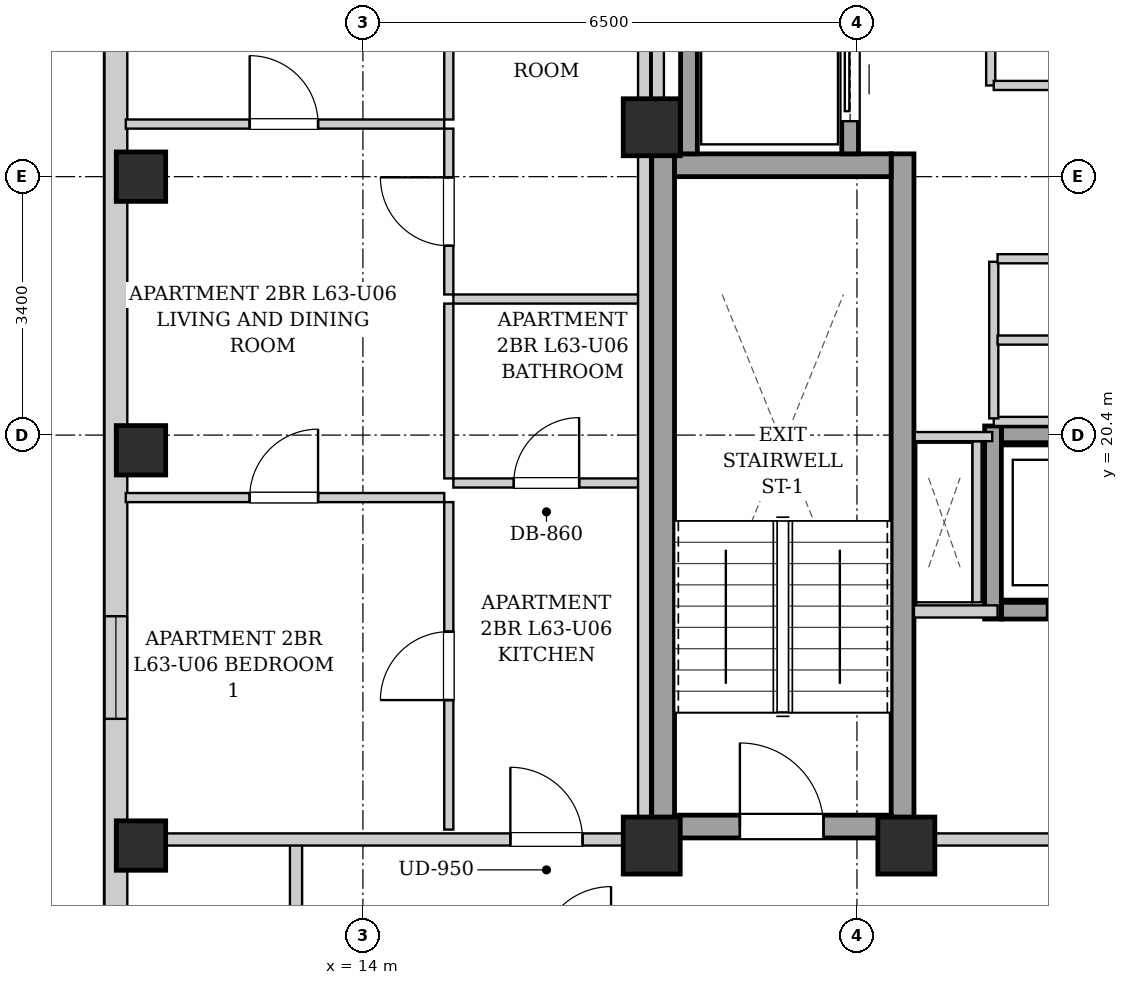
"""IFC4 building model, lengths in metres.
Left out: names, types, materials, properties, quantities, classifications, styles, units other than length and angle.
Written with IfcOpenShell. Run it as: python <this file> out.ifc"""

import sys

from ifc_helpers import new_model, si_unit, direction, frame, frame_2d, origin, origin_2d, place, context, subcontext, project, spatial, rectangle, extrude, element, fill, save


model = new_model("IFC4")
c1 = context("Model", 3, precision=1e-05, world=origin(), true_north=direction((0.0, 1.0)))
c2 = subcontext(c1, "Body", "Model", "MODEL_VIEW")
j1 = project(units=[si_unit("LENGTHUNIT", "METRE"), si_unit("PLANEANGLEUNIT", "RADIAN")], contexts=[c1])
p1 = place(None, origin())
s1 = spatial("IfcSite", under=j1, at=p1, CompositionType="ELEMENT")
p2 = place(p1, origin())
s2 = spatial("IfcBuilding", under=s1, at=p2, CompositionType="ELEMENT")
p3 = place(p2, frame((0.0, 0.0, 217.3)))
s3 = spatial("IfcBuildingStorey", under=s2, at=p3, CompositionType="ELEMENT", Elevation=217.3)
for number, where, z_axis, x_axis in (
    (1, (11.08, 15.0, 0.0), (0.0, 0.0, 1.0), (1.0, 0.0, 0.0)),
    (2, (11.08, 20.2, 0.0), (0.0, 0.0, 1.0), (1.0, 0.0, 0.0)),
    (3, (11.08, 23.8, 0.0), (0.0, 0.0, 1.0), (1.0, 0.0, 0.0)),
):
    element("IfcColumn", number, at=place(p3, frame(where, z_axis=z_axis, x_axis=x_axis)), inside=s3, PredefinedType="COLUMN", context=c2, shape_type="SweptSolid", body=[
        extrude(rectangle(XDim=0.65, YDim=0.65, at=origin_2d()), origin(), (0.0, 0.0, 1.0), 3.4),
    ])
for number, where, z_axis, x_axis in (
    (4, (17.8, 15.0, 0.0), (0.0, 0.0, 1.0), (1.0, 0.0, 0.0)),
    (5, (21.15, 15.0, 0.0), (0.0, 0.0, 1.0), (1.0, 0.0, 0.0)),
    (6, (17.8, 24.45, 0.0), (0.0, 0.0, 1.0), (1.0, 0.0, 0.0)),
):
    element("IfcColumn", number, at=place(p3, frame(where, z_axis=z_axis, x_axis=x_axis)), inside=s3, PredefinedType="COLUMN", context=c2, shape_type="SweptSolid", body=[
        extrude(rectangle(XDim=0.75, YDim=0.75, at=origin_2d()), origin(), (0.0, 0.0, 1.0), 3.4),
    ])
p4 = place(p3, frame((10.75, 6.3, 0.0), z_axis=(0.0, 0.0, 1.0), x_axis=(0.0, 1.0, 0.0)))
e7 = element("IfcWall", 7, at=p4, inside=s3, PredefinedType="SOLIDWALL", context=c2, shape_type="SweptSolid", body=[
    extrude(rectangle(XDim=31.4, YDim=0.3, at=frame_2d((15.7, 0.0))), origin(), (0.0, 0.0, 1.0), 3.14),
])
p5 = place(p4, frame((1.504, 0.0, 0.55)))
e8 = element("IfcOpeningElement", 8, at=p5, cuts=e7, PredefinedType="OPENING", context=c2, shape_type="SweptSolid", body=[
    extrude(rectangle(XDim=1.35, YDim=1.2, at=frame_2d((0.675, 0.6))), frame((0.0, 0.16, 0.0), z_axis=(0.0, -1.0, 0.0), x_axis=(1.0, 0.0, 0.0)), (0.0, 0.0, 1.0), 0.32),
])
p6 = place(p4, frame((28.546, 0.0, 0.55)))
e9 = element("IfcOpeningElement", 9, at=p6, cuts=e7, PredefinedType="OPENING", context=c2, shape_type="SweptSolid", body=[
    extrude(rectangle(XDim=1.35, YDim=1.2, at=frame_2d((0.675, 0.6))), frame((0.0, 0.16, 0.0), z_axis=(0.0, -1.0, 0.0), x_axis=(1.0, 0.0, 0.0)), (0.0, 0.0, 1.0), 0.32),
])
p7 = place(p4, frame((10.367, 0.0, 0.55)))
e10 = element("IfcOpeningElement", 10, at=p7, cuts=e7, PredefinedType="OPENING", context=c2, shape_type="SweptSolid", body=[
    extrude(rectangle(XDim=1.35, YDim=1.2, at=frame_2d((0.675, 0.6))), frame((0.0, 0.16, 0.0), z_axis=(0.0, -1.0, 0.0), x_axis=(1.0, 0.0, 0.0)), (0.0, 0.0, 1.0), 0.32),
])
p8 = place(p4, frame((19.683, 0.0, 0.55)))
e11 = element("IfcOpeningElement", 11, at=p8, cuts=e7, PredefinedType="OPENING", context=c2, shape_type="SweptSolid", body=[
    extrude(rectangle(XDim=1.35, YDim=1.2, at=frame_2d((0.675, 0.6))), frame((0.0, 0.16, 0.0), z_axis=(0.0, -1.0, 0.0), x_axis=(1.0, 0.0, 0.0)), (0.0, 0.0, 1.0), 0.32),
])
for number, where, z_axis, x_axis in (
    (12, (17.95, 15.1, 0.0), (0.0, 0.0, 1.0), (0.0, 1.0, 0.0)),
    (13, (21.1, 15.1, 0.0), (0.0, 0.0, 1.0), (0.0, 1.0, 0.0)),
):
    element("IfcWall", number, at=place(p3, frame(where, z_axis=z_axis, x_axis=x_axis)), inside=s3, PredefinedType="SHEAR", context=c2, shape_type="SweptSolid", body=[
        extrude(rectangle(XDim=9.0, YDim=0.3, at=frame_2d((4.5, 0.0))), origin(), (0.0, 0.0, 1.0), 3.14),
    ])
p9 = place(p3, frame((18.1, 23.95, 0.0), z_axis=(0.0, 0.0, 1.0), x_axis=(1.0, 0.0, 0.0)))
e14 = element("IfcWall", 14, at=p9, inside=s3, PredefinedType="SHEAR", context=c2, shape_type="SweptSolid", body=[
    extrude(rectangle(XDim=2.85, YDim=0.3, at=frame_2d((1.425, 0.0))), origin(), (0.0, 0.0, 1.0), 3.14),
])
p10 = place(p3, frame((18.1, 15.25, 0.0), z_axis=(0.0, 0.0, 1.0), x_axis=(1.0, 0.0, 0.0)))
e15 = element("IfcWall", 15, at=p10, inside=s3, PredefinedType="SHEAR", context=c2, shape_type="SweptSolid", body=[
    extrude(rectangle(XDim=2.85, YDim=0.3, at=frame_2d((1.425, 0.0))), origin(), (0.0, 0.0, 1.0), 3.14),
])
p11 = place(p10, frame((0.86, 0.0, 0.0)))
e16 = element("IfcOpeningElement", 16, at=p11, cuts=e15, PredefinedType="OPENING", context=c2, shape_type="SweptSolid", body=[
    extrude(rectangle(XDim=1.1, YDim=2.05, at=frame_2d((0.55, 1.025))), frame((0.0, 0.16, 0.0), z_axis=(0.0, -1.0, 0.0), x_axis=(1.0, 0.0, 0.0)), (0.0, 0.0, 1.0), 0.32),
])
p12 = place(p3, frame((18.29, 24.1, 0.0), z_axis=(0.0, 0.0, 1.0), x_axis=(0.0, 1.0, 0.0)))
e17 = element("IfcWall", 17, at=p12, inside=s3, PredefinedType="SHEAR", context=c2, shape_type="SweptSolid", body=[
    extrude(rectangle(XDim=4.14, YDim=0.22, at=frame_2d((2.07, 0.0))), origin(), (0.0, 0.0, 1.0), 3.14),
])
p13 = place(p3, frame((20.41, 24.1, 0.0), z_axis=(0.0, 0.0, 1.0), x_axis=(0.0, 1.0, 0.0)))
e18 = element("IfcWall", 18, at=p13, inside=s3, PredefinedType="SHEAR", context=c2, shape_type="SweptSolid", body=[
    extrude(rectangle(XDim=1.96, YDim=0.22, at=frame_2d((0.98, 0.0))), origin(), (0.0, 0.0, 1.0), 3.14),
])
p14 = place(p13, frame((0.43, 0.0, 0.0)))
e19 = element("IfcOpeningElement", 19, at=p14, cuts=e18, PredefinedType="OPENING", context=c2, shape_type="SweptSolid", body=[
    extrude(rectangle(XDim=1.1, YDim=2.15, at=frame_2d((0.55, 1.075))), frame((0.0, 0.12, 0.0), z_axis=(0.0, -1.0, 0.0), x_axis=(1.0, 0.0, 0.0)), (0.0, 0.0, 1.0), 0.24),
])
p15 = place(p3, frame((22.4, 18.09, 0.0), z_axis=(0.0, 0.0, 1.0), x_axis=(1.0, 0.0, 0.0)))
e20 = element("IfcWall", 20, at=p15, inside=s3, PredefinedType="SHEAR", context=c2, shape_type="SweptSolid", body=[
    extrude(rectangle(XDim=2.4, YDim=0.22, at=frame_2d((1.2, 0.0))), origin(), (0.0, 0.0, 1.0), 3.14),
])
p16 = place(p15, frame((0.6, 0.0, 0.0)))
e21 = element("IfcOpeningElement", 21, at=p16, cuts=e20, PredefinedType="OPENING", context=c2, shape_type="SweptSolid", body=[
    extrude(rectangle(XDim=1.2, YDim=2.15, at=frame_2d((0.6, 1.075))), frame((0.0, 0.12, 0.0), z_axis=(0.0, -1.0, 0.0), x_axis=(1.0, 0.0, 0.0)), (0.0, 0.0, 1.0), 0.24),
])
p17 = place(p3, frame((22.4, 20.41, 0.0), z_axis=(0.0, 0.0, 1.0), x_axis=(1.0, 0.0, 0.0)))
e22 = element("IfcWall", 22, at=p17, inside=s3, PredefinedType="SHEAR", context=c2, shape_type="SweptSolid", body=[
    extrude(rectangle(XDim=2.4, YDim=0.22, at=frame_2d((1.2, 0.0))), origin(), (0.0, 0.0, 1.0), 3.14),
])
p18 = place(p3, frame((22.29, 17.98, 0.0), z_axis=(0.0, 0.0, 1.0), x_axis=(0.0, 1.0, 0.0)))
e23 = element("IfcWall", 23, at=p18, inside=s3, PredefinedType="SHEAR", context=c2, shape_type="SweptSolid", body=[
    extrude(rectangle(XDim=2.54, YDim=0.22, at=frame_2d((1.27, 0.0))), origin(), (0.0, 0.0, 1.0), 3.14),
])
p19 = place(p3, frame((21.25, 15.08, 0.0), z_axis=(0.0, 0.0, 1.0), x_axis=(1.0, 0.0, 0.0)))
e24 = element("IfcWall", 24, at=p19, inside=s3, PredefinedType="PARTITIONING", context=c2, shape_type="SweptSolid", body=[
    extrude(rectangle(XDim=8.5, YDim=0.16, at=frame_2d((4.25, 0.0))), origin(), (0.0, 0.0, 1.0), 2.668),
])
p20 = place(p19, frame((3.725, 0.0, 0.0)))
e25 = element("IfcOpeningElement", 25, at=p20, cuts=e24, PredefinedType="OPENING", context=c2, shape_type="SweptSolid", body=[
    extrude(rectangle(XDim=1.05, YDim=2.05, at=frame_2d((0.525, 1.025))), frame((0.0, 0.09, 0.0), z_axis=(0.0, -1.0, 0.0), x_axis=(1.0, 0.0, 0.0)), (0.0, 0.0, 1.0), 0.18),
])
p21 = place(p3, frame((21.25, 18.08, 0.0), z_axis=(0.0, 0.0, 1.0), x_axis=(1.0, 0.0, 0.0)))
e26 = element("IfcWall", 26, at=p21, inside=s3, PredefinedType="PARTITIONING", context=c2, shape_type="SweptSolid", body=[
    extrude(rectangle(XDim=1.1, YDim=0.16, at=frame_2d((0.55, 0.0))), origin(), (0.0, 0.0, 1.0), 3.14),
])
p22 = place(p3, frame((17.88, 24.12, 0.0), z_axis=(0.0, 0.0, 1.0), x_axis=(0.0, 1.0, 0.0)))
e27 = element("IfcWall", 27, at=p22, inside=s3, PredefinedType="PARTITIONING", context=c2, shape_type="SweptSolid", body=[
    extrude(rectangle(XDim=4.76, YDim=0.16, at=frame_2d((2.38, 0.0))), origin(), (0.0, 0.0, 1.0), 2.475),
])
p23 = place(p3, frame((22.08, 18.2, 0.0), z_axis=(0.0, 0.0, 1.0), x_axis=(0.0, 1.0, 0.0)))
e28 = element("IfcWall", 28, at=p23, inside=s3, PredefinedType="PARTITIONING", context=c2, shape_type="SweptSolid", body=[
    extrude(rectangle(XDim=2.12, YDim=0.12, at=frame_2d((1.06, 0.0))), origin(), (0.0, 0.0, 1.0), 3.14),
])
p24 = place(p3, frame((22.28, 20.38, 0.0), z_axis=(0.0, 0.0, 1.0), x_axis=(-1.0, 0.0, 0.0)))
e29 = element("IfcWall", 29, at=p24, inside=s3, PredefinedType="PARTITIONING", context=c2, shape_type="SweptSolid", body=[
    extrude(rectangle(XDim=1.02, YDim=0.12, at=frame_2d((0.51, 0.0))), origin(), (0.0, 0.0, 1.0), 3.14),
])
p25 = place(p3, frame((22.26, 25.0, 0.0), z_axis=(0.0, 0.0, 1.0), x_axis=(0.0, 1.0, 0.0)))
e30 = element("IfcWall", 30, at=p25, inside=s3, PredefinedType="PARTITIONING", context=c2, shape_type="SweptSolid", body=[
    extrude(rectangle(XDim=3.86, YDim=0.12, at=frame_2d((1.93, 0.0))), origin(), (0.0, 0.0, 1.0), 3.14),
])
p26 = place(p3, frame((22.3, 25.0, 0.0), z_axis=(0.0, 0.0, 1.0), x_axis=(1.0, 0.0, 0.0)))
e31 = element("IfcWall", 31, at=p26, inside=s3, PredefinedType="PARTITIONING", context=c2, shape_type="SweptSolid", body=[
    extrude(rectangle(XDim=2.04, YDim=0.12, at=frame_2d((1.02, 0.0))), origin(), (0.0, 0.0, 1.0), 3.14),
])
p27 = place(p3, frame((22.3, 20.58, 0.0), z_axis=(0.0, 0.0, 1.0), x_axis=(1.0, 0.0, 0.0)))
e32 = element("IfcWall", 32, at=p27, inside=s3, PredefinedType="PARTITIONING", context=c2, shape_type="SweptSolid", body=[
    extrude(rectangle(XDim=7.35, YDim=0.12, at=frame_2d((3.675, 0.0))), origin(), (0.0, 0.0, 1.0), 3.14),
])
p28 = place(p3, frame((22.3, 20.62, 0.0), z_axis=(0.0, 0.0, 1.0), x_axis=(0.0, 1.0, 0.0)))
e33 = element("IfcWall", 33, at=p28, inside=s3, PredefinedType="PARTITIONING", context=c2, shape_type="SweptSolid", body=[
    extrude(rectangle(XDim=2.06, YDim=0.12, at=frame_2d((1.03, 0.0))), origin(), (0.0, 0.0, 1.0), 3.14),
])
p29 = place(p3, frame((22.35, 21.65, 0.0), z_axis=(0.0, 0.0, 1.0), x_axis=(1.0, 0.0, 0.0)))
e34 = element("IfcWall", 34, at=p29, inside=s3, PredefinedType="PARTITIONING", context=c2, shape_type="SweptSolid", body=[
    extrude(rectangle(XDim=5.79, YDim=0.12, at=frame_2d((2.895, 0.0))), origin(), (0.0, 0.0, 1.0), 3.14),
])
p30 = place(p3, frame((22.35, 22.72, 0.0), z_axis=(0.0, 0.0, 1.0), x_axis=(1.0, 0.0, 0.0)))
e35 = element("IfcWall", 35, at=p30, inside=s3, PredefinedType="PARTITIONING", context=c2, shape_type="SweptSolid", body=[
    extrude(rectangle(XDim=7.27, YDim=0.12, at=frame_2d((3.635, 0.0))), origin(), (0.0, 0.0, 1.0), 3.14),
])
p31 = place(p30, frame((2.57, 0.0, 0.0)))
e36 = element("IfcOpeningElement", 36, at=p31, cuts=e35, PredefinedType="OPENING", context=c2, shape_type="SweptSolid", body=[
    extrude(rectangle(XDim=0.86, YDim=2.05, at=frame_2d((0.43, 1.025))), frame((0.0, 0.07, 0.0), z_axis=(0.0, -1.0, 0.0), x_axis=(1.0, 0.0, 0.0)), (0.0, 0.0, 1.0), 0.14),
])
p32 = place(p30, frame((6.06, 0.0, 0.0)))
e37 = element("IfcOpeningElement", 37, at=p32, cuts=e35, PredefinedType="OPENING", context=c2, shape_type="SweptSolid", body=[
    extrude(rectangle(XDim=0.86, YDim=2.05, at=frame_2d((0.43, 1.025))), frame((0.0, 0.07, 0.0), z_axis=(0.0, -1.0, 0.0), x_axis=(1.0, 0.0, 0.0)), (0.0, 0.0, 1.0), 0.14),
])
p33 = place(p3, frame((13.12, 13.51, 0.0), z_axis=(0.0, 0.0, 1.0), x_axis=(0.0, 1.0, 0.0)))
e38 = element("IfcWall", 38, at=p33, inside=s3, PredefinedType="PARTITIONING", context=c2, shape_type="SweptSolid", body=[
    extrude(rectangle(XDim=1.58, YDim=0.16, at=frame_2d((0.79, 0.0))), origin(), (0.0, 0.0, 1.0), 3.14),
])
p34 = place(p3, frame((10.88, 15.08, 0.0), z_axis=(0.0, 0.0, 1.0), x_axis=(1.0, 0.0, 0.0)))
e39 = element("IfcWall", 39, at=p34, inside=s3, PredefinedType="PARTITIONING", context=c2, shape_type="SweptSolid", body=[
    extrude(rectangle(XDim=6.88, YDim=0.16, at=frame_2d((3.44, 0.0))), origin(), (0.0, 0.0, 1.0), 2.668),
])
p35 = place(p34, frame((5.06, 0.0, 0.0)))
e40 = element("IfcOpeningElement", 40, at=p35, cuts=e39, PredefinedType="OPENING", context=c2, shape_type="SweptSolid", body=[
    extrude(rectangle(XDim=0.95, YDim=2.1, at=frame_2d((0.475, 1.05))), frame((0.0, 0.09, 0.0), z_axis=(0.0, -1.0, 0.0), x_axis=(1.0, 0.0, 0.0)), (0.0, 0.0, 1.0), 0.18),
])
p36 = place(p3, frame((15.19, 22.19, 0.0), z_axis=(0.0, 0.0, 1.0), x_axis=(1.0, 0.0, 0.0)))
e41 = element("IfcWall", 41, at=p36, inside=s3, PredefinedType="PARTITIONING", context=c2, shape_type="SweptSolid", body=[
    extrude(rectangle(XDim=2.45, YDim=0.12, at=frame_2d((1.225, 0.0))), origin(), (0.0, 0.0, 1.0), 3.14),
])
p37 = place(p3, frame((15.13, 22.25, 0.0), z_axis=(0.0, 0.0, 1.0), x_axis=(0.0, 1.0, 0.0)))
e42 = element("IfcWall", 42, at=p37, inside=s3, PredefinedType="PARTITIONING", context=c2, shape_type="SweptSolid", body=[
    extrude(rectangle(XDim=2.182, YDim=0.12, at=frame_2d((1.091, 0.0))), origin(), (0.0, 0.0, 1.0), 3.14),
])
p38 = place(p37, frame((0.641, 0.0, 0.0)))
e43 = element("IfcOpeningElement", 43, at=p38, cuts=e42, PredefinedType="OPENING", context=c2, shape_type="SweptSolid", body=[
    extrude(rectangle(XDim=0.9, YDim=2.05, at=frame_2d((0.45, 1.025))), frame((0.0, 0.07, 0.0), z_axis=(0.0, -1.0, 0.0), x_axis=(1.0, 0.0, 0.0)), (0.0, 0.0, 1.0), 0.14),
])
p39 = place(p3, frame((15.13, 24.552, 0.0), z_axis=(0.0, 0.0, 1.0), x_axis=(0.0, 1.0, 0.0)))
e44 = element("IfcWall", 44, at=p39, inside=s3, PredefinedType="PARTITIONING", context=c2, shape_type="SweptSolid", body=[
    extrude(rectangle(XDim=4.308, YDim=0.12, at=frame_2d((2.154, 0.0))), origin(), (0.0, 0.0, 1.0), 3.14),
])
p40 = place(p39, frame((1.704, 0.0, 0.0)))
e45 = element("IfcOpeningElement", 45, at=p40, cuts=e44, PredefinedType="OPENING", context=c2, shape_type="SweptSolid", body=[
    extrude(rectangle(XDim=0.9, YDim=2.05, at=frame_2d((0.45, 1.025))), frame((0.0, 0.07, 0.0), z_axis=(0.0, -1.0, 0.0), x_axis=(1.0, 0.0, 0.0)), (0.0, 0.0, 1.0), 0.14),
])
p41 = place(p3, frame((15.19, 19.77, 0.0), z_axis=(0.0, 0.0, 1.0), x_axis=(1.0, 0.0, 0.0)))
e46 = element("IfcWall", 46, at=p41, inside=s3, PredefinedType="PARTITIONING", context=c2, shape_type="SweptSolid", body=[
    extrude(rectangle(XDim=2.45, YDim=0.12, at=frame_2d((1.225, 0.0))), origin(), (0.0, 0.0, 1.0), 3.14),
])
p42 = place(p41, frame((0.795, 0.0, 0.0)))
e47 = element("IfcOpeningElement", 47, at=p42, cuts=e46, PredefinedType="OPENING", context=c2, shape_type="SweptSolid", body=[
    extrude(rectangle(XDim=0.86, YDim=2.05, at=frame_2d((0.43, 1.025))), frame((0.0, 0.07, 0.0), z_axis=(0.0, -1.0, 0.0), x_axis=(1.0, 0.0, 0.0)), (0.0, 0.0, 1.0), 0.14),
])
p43 = place(p3, frame((15.13, 19.83, 0.0), z_axis=(0.0, 0.0, 1.0), x_axis=(0.0, 1.0, 0.0)))
e48 = element("IfcWall", 48, at=p43, inside=s3, PredefinedType="PARTITIONING", context=c2, shape_type="SweptSolid", body=[
    extrude(rectangle(XDim=2.3, YDim=0.12, at=frame_2d((1.15, 0.0))), origin(), (0.0, 0.0, 1.0), 3.14),
])
p44 = place(p3, frame((15.13, 15.21, 0.0), z_axis=(0.0, 0.0, 1.0), x_axis=(0.0, 1.0, 0.0)))
e49 = element("IfcWall", 49, at=p44, inside=s3, PredefinedType="PARTITIONING", context=c2, shape_type="SweptSolid", body=[
    extrude(rectangle(XDim=4.308, YDim=0.12, at=frame_2d((2.154, 0.0))), origin(), (0.0, 0.0, 1.0), 3.14),
])
p45 = place(p44, frame((1.704, 0.0, 0.0)))
e50 = element("IfcOpeningElement", 50, at=p45, cuts=e49, PredefinedType="OPENING", context=c2, shape_type="SweptSolid", body=[
    extrude(rectangle(XDim=0.9, YDim=2.05, at=frame_2d((0.45, 1.025))), frame((0.0, 0.07, 0.0), z_axis=(0.0, -1.0, 0.0), x_axis=(1.0, 0.0, 0.0)), (0.0, 0.0, 1.0), 0.14),
])
p46 = place(p3, frame((10.88, 19.578, 0.0), z_axis=(0.0, 0.0, 1.0), x_axis=(1.0, 0.0, 0.0)))
e51 = element("IfcWall", 51, at=p46, inside=s3, PredefinedType="PARTITIONING", context=c2, shape_type="SweptSolid", body=[
    extrude(rectangle(XDim=4.19, YDim=0.12, at=frame_2d((2.095, 0.0))), origin(), (0.0, 0.0, 1.0), 3.14),
])
p47 = place(p46, frame((1.63, 0.0, 0.0)))
e52 = element("IfcOpeningElement", 52, at=p47, cuts=e51, PredefinedType="OPENING", context=c2, shape_type="SweptSolid", body=[
    extrude(rectangle(XDim=0.9, YDim=2.05, at=frame_2d((0.45, 1.025))), frame((0.0, 0.07, 0.0), z_axis=(0.0, -1.0, 0.0), x_axis=(1.0, 0.0, 0.0)), (0.0, 0.0, 1.0), 0.14),
])
p48 = place(p3, frame((10.88, 24.492, 0.0), z_axis=(0.0, 0.0, 1.0), x_axis=(1.0, 0.0, 0.0)))
e53 = element("IfcWall", 53, at=p48, inside=s3, PredefinedType="PARTITIONING", context=c2, shape_type="SweptSolid", body=[
    extrude(rectangle(XDim=4.19, YDim=0.12, at=frame_2d((2.095, 0.0))), origin(), (0.0, 0.0, 1.0), 2.878),
])
p49 = place(p48, frame((1.63, 0.0, 0.0)))
e54 = element("IfcOpeningElement", 54, at=p49, cuts=e53, PredefinedType="OPENING", context=c2, shape_type="SweptSolid", body=[
    extrude(rectangle(XDim=0.9, YDim=2.05, at=frame_2d((0.45, 1.025))), frame((0.0, 0.07, 0.0), z_axis=(0.0, -1.0, 0.0), x_axis=(1.0, 0.0, 0.0)), (0.0, 0.0, 1.0), 0.14),
])
p50 = place(p3, frame((17.7, 15.02, 0.0), z_axis=(0.0, 0.0, 1.0), x_axis=(0.0, 1.0, 0.0)))
e55 = element("IfcWall", 55, at=p50, inside=s3, PredefinedType="PARTITIONING", context=c2, shape_type="SweptSolid", body=[
    extrude(rectangle(XDim=13.98, YDim=0.16, at=frame_2d((6.99, 0.0))), origin(), (0.0, 0.0, 1.0), 2.475),
])
p51 = place(p11, origin())
e56 = element("IfcDoor", 56, at=p51, inside=s3, OperationType="SINGLE_SWING_LEFT", PredefinedType="DOOR", context=c2, shape_type="SweptSolid", body=[
    extrude(rectangle(XDim=1.1, YDim=2.05, at=frame_2d((0.55, 1.025))), frame((0.0, 0.025, 0.0), z_axis=(0.0, -1.0, 0.0), x_axis=(1.0, 0.0, 0.0)), (0.0, 0.0, 1.0), 0.05),
])
fill(e16, e56)
p52 = place(p14, origin())
e57 = element("IfcDoor", 57, at=p52, inside=s3, OperationType="SLIDING_TO_LEFT", PredefinedType="DOOR", context=c2, shape_type="SweptSolid", body=[
    extrude(rectangle(XDim=1.1, YDim=2.15, at=frame_2d((0.55, 1.075))), frame((0.0, 0.025, 0.0), z_axis=(0.0, -1.0, 0.0), x_axis=(1.0, 0.0, 0.0)), (0.0, 0.0, 1.0), 0.05),
])
fill(e19, e57)
p53 = place(p16, origin())
e58 = element("IfcDoor", 58, at=p53, inside=s3, OperationType="SLIDING_TO_LEFT", PredefinedType="DOOR", context=c2, shape_type="SweptSolid", body=[
    extrude(rectangle(XDim=1.2, YDim=2.15, at=frame_2d((0.6, 1.075))), frame((0.0, 0.025, 0.0), z_axis=(0.0, -1.0, 0.0), x_axis=(1.0, 0.0, 0.0)), (0.0, 0.0, 1.0), 0.05),
])
fill(e21, e58)
p54 = place(p35, origin())
e59 = element("IfcDoor", 59, at=p54, inside=s3, OperationType="SINGLE_SWING_LEFT", PredefinedType="DOOR", context=c2, shape_type="SweptSolid", body=[
    extrude(rectangle(XDim=0.95, YDim=2.1, at=frame_2d((0.475, 1.05))), frame((0.0, 0.025, 0.0), z_axis=(0.0, -1.0, 0.0), x_axis=(1.0, 0.0, 0.0)), (0.0, 0.0, 1.0), 0.05),
])
fill(e40, e59)
p55 = place(p38, origin())
e60 = element("IfcDoor", 60, at=p55, inside=s3, OperationType="SINGLE_SWING_RIGHT", PredefinedType="DOOR", context=c2, shape_type="SweptSolid", body=[
    extrude(rectangle(XDim=0.9, YDim=2.05, at=frame_2d((0.45, 1.025))), frame((0.0, 0.025, 0.0), z_axis=(0.0, -1.0, 0.0), x_axis=(1.0, 0.0, 0.0)), (0.0, 0.0, 1.0), 0.05),
])
fill(e43, e60)
p56 = place(p42, origin())
e61 = element("IfcDoor", 61, at=p56, inside=s3, OperationType="SINGLE_SWING_RIGHT", PredefinedType="DOOR", context=c2, shape_type="SweptSolid", body=[
    extrude(rectangle(XDim=0.86, YDim=2.05, at=frame_2d((0.43, 1.025))), frame((0.0, 0.025, 0.0), z_axis=(0.0, -1.0, 0.0), x_axis=(1.0, 0.0, 0.0)), (0.0, 0.0, 1.0), 0.05),
])
fill(e47, e61)
p57 = place(p45, origin())
e62 = element("IfcDoor", 62, at=p57, inside=s3, OperationType="SINGLE_SWING_LEFT", PredefinedType="DOOR", context=c2, shape_type="SweptSolid", body=[
    extrude(rectangle(XDim=0.9, YDim=2.05, at=frame_2d((0.45, 1.025))), frame((0.0, 0.025, 0.0), z_axis=(0.0, -1.0, 0.0), x_axis=(1.0, 0.0, 0.0)), (0.0, 0.0, 1.0), 0.05),
])
fill(e50, e62)
p58 = place(p47, origin())
e63 = element("IfcDoor", 63, at=p58, inside=s3, OperationType="SINGLE_SWING_RIGHT", PredefinedType="DOOR", context=c2, shape_type="SweptSolid", body=[
    extrude(rectangle(XDim=0.9, YDim=2.05, at=frame_2d((0.45, 1.025))), frame((0.0, 0.025, 0.0), z_axis=(0.0, -1.0, 0.0), x_axis=(1.0, 0.0, 0.0)), (0.0, 0.0, 1.0), 0.05),
])
fill(e52, e63)
p59 = place(p49, origin())
e64 = element("IfcDoor", 64, at=p59, inside=s3, OperationType="SINGLE_SWING_LEFT", PredefinedType="DOOR", context=c2, shape_type="SweptSolid", body=[
    extrude(rectangle(XDim=0.9, YDim=2.05, at=frame_2d((0.45, 1.025))), frame((0.0, 0.025, 0.0), z_axis=(0.0, -1.0, 0.0), x_axis=(1.0, 0.0, 0.0)), (0.0, 0.0, 1.0), 0.05),
])
fill(e54, e64)
p60 = place(p7, origin())
e65 = element("IfcWindow", 65, at=p60, inside=s3, PartitioningType="SINGLE_PANEL", PredefinedType="WINDOW", context=c2, shape_type="SweptSolid", body=[
    extrude(rectangle(XDim=1.35, YDim=1.2, at=frame_2d((0.675, 0.6))), frame((0.0, 0.03, 0.0), z_axis=(0.0, -1.0, 0.0), x_axis=(1.0, 0.0, 0.0)), (0.0, 0.0, 1.0), 0.06),
])
fill(e10, e65)
save(model, sys.argv[1])
